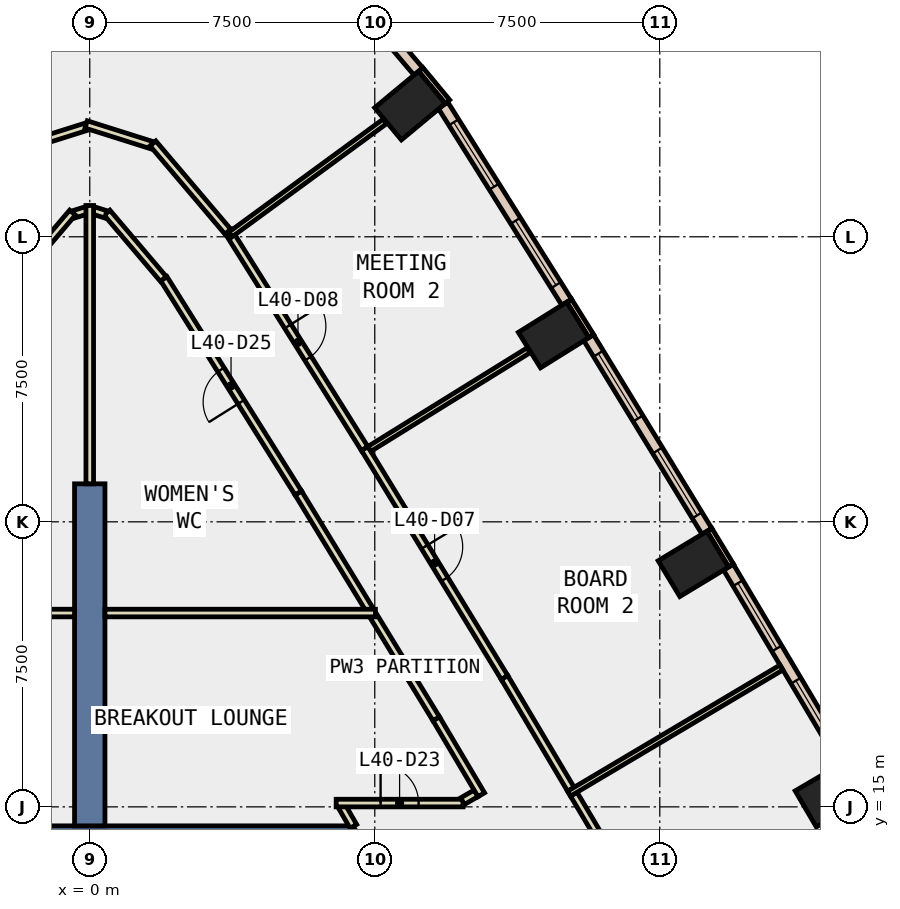
"""IFC4 building model, lengths in metres.
Left out: names, types, materials, properties, quantities, classifications, styles, units other than length and angle.
Written with IfcOpenShell. Run it as: python <this file> out.ifc"""

import sys

from ifc_helpers import new_model, si_unit, direction, frame, frame_2d, origin, origin_2d, place, context, subcontext, project, spatial, polyline, rectangle, outline, extrude, element, fill, save


model = new_model("IFC4")
c1 = context("Model", 3, precision=1e-05, world=origin(), true_north=direction((0.0, 1.0)))
c2 = subcontext(c1, "Body", "Model", "MODEL_VIEW")
j1 = project(units=[si_unit("LENGTHUNIT", "METRE"), si_unit("PLANEANGLEUNIT", "RADIAN")], contexts=[c1])
p1 = place(None, origin())
s1 = spatial("IfcSite", under=j1, at=p1, CompositionType="ELEMENT")
p2 = place(p1, origin())
s2 = spatial("IfcBuilding", under=s1, at=p2, CompositionType="ELEMENT")
p3 = place(p2, frame((0.0, 0.0, 180.2)))
s3 = spatial("IfcBuildingStorey", under=s2, at=p3, CompositionType="ELEMENT", Elevation=180.2)
for number, where, z_axis, x_axis in (
    (1, (19.488, 15.326, -0.4), (0.0, 0.0, 1.0), (-0.506, 0.863, 0.0)),
    (2, (15.884, 21.393, -0.4), (0.0, 0.0, 1.0), (-0.518, 0.855, 0.0)),
    (3, (12.206, 27.416, -0.4), (0.0, 0.0, 1.0), (-0.53, 0.848, 0.0)),
    (4, (8.426, 33.452, -0.4), (0.0, 0.0, 1.0), (-0.639, 0.769, 0.0)),
):
    element("IfcColumn", number, at=place(p3, frame(where, z_axis=z_axis, x_axis=x_axis)), inside=s3, PredefinedType="COLUMN", context=c2, shape_type="SweptSolid", body=[
        extrude(rectangle(XDim=1.1, YDim=1.5, at=origin_2d()), origin(), (0.0, 0.0, 1.0), 4.0),
    ])
p4 = place(p3, frame((0.0, 0.0, -0.4)))
e5 = element("IfcWall", 5, at=p4, inside=s3, PredefinedType="SHEAR", context=c2, shape_type="SweptSolid", body=[
    extrude(outline(polyline([(6.651, 12.98), (7.517, 13.48), (6.928, 14.5), (6.351, 13.5), (6.651, 12.98)])), origin(), (0.0, 0.0, 1.0), 4.0),
])
p5 = place(p3, frame((0.0, 0.0, -0.4)))
e6 = element("IfcWall", 6, at=p5, inside=s3, PredefinedType="SHEAR", context=c2, shape_type="SweptSolid", body=[
    extrude(outline(polyline([(6.928, 14.5), (-6.928, 14.5), (-6.351, 13.5), (6.351, 13.5), (6.928, 14.5)])), origin(), (0.0, 0.0, 1.0), 4.0),
])
p6 = place(p3, frame((0.0, 14.5, -0.4), z_axis=(0.0, 0.0, 1.0), x_axis=(0.0, 1.0, 0.0)))
e7 = element("IfcWall", 7, at=p6, inside=s3, PredefinedType="SHEAR", context=c2, shape_type="SweptSolid", body=[
    extrude(rectangle(XDim=9.0, YDim=0.8, at=frame_2d((4.5, 0.0))), origin(), (0.0, 0.0, 1.0), 4.0),
])
p7 = place(p3, frame((16.875, 21.35, 0.0), z_axis=(0.0, 0.0, 1.0), x_axis=(-0.518178754102, 0.855272341888, 0.0)))
e8 = element("IfcWall", 8, at=p7, inside=s3, PredefinedType="STANDARD", context=c2, shape_type="SweptSolid", body=[
    extrude(rectangle(XDim=1.1, YDim=0.15, at=frame_2d((0.55, 0.0))), origin(), (0.0, 0.0, 1.0), 3.6),
])
p8 = place(p3, frame((13.197, 27.387, 0.0), z_axis=(0.0, 0.0, 1.0), x_axis=(-0.529879262372, 0.848073090782, 0.0)))
e9 = element("IfcWall", 9, at=p8, inside=s3, PredefinedType="STANDARD", context=c2, shape_type="SweptSolid", body=[
    extrude(rectangle(XDim=1.1, YDim=0.15, at=frame_2d((0.55, 0.0))), origin(), (0.0, 0.0, 1.0), 3.6),
])
p9 = place(p3, frame((9.412, 33.556, 0.0), z_axis=(0.0, 0.0, 1.0), x_axis=(-0.639092407347, 0.769129959676, 0.0)))
e10 = element("IfcWall", 10, at=p9, inside=s3, PredefinedType="STANDARD", context=c2, shape_type="SweptSolid", body=[
    extrude(rectangle(XDim=1.1, YDim=0.15, at=frame_2d((0.55, 0.0))), origin(), (0.0, 0.0, 1.0), 3.6),
])
p10 = place(p3, frame((19.854, 16.177, 0.0), z_axis=(0.0, 0.0, 1.0), x_axis=(-0.510653096173, 0.859786842984, 0.0)))
e11 = element("IfcWall", 11, at=p10, inside=s3, PredefinedType="STANDARD", context=c2, shape_type="SweptSolid", body=[
    extrude(rectangle(XDim=5.969, YDim=0.3, at=frame_2d((2.984, 0.0))), origin(), (0.0, 0.0, 1.0), 3.6),
])
p11 = place(p10, frame((0.492, 0.0, 0.9)))
e12 = element("IfcOpeningElement", 12, at=p11, cuts=e11, PredefinedType="OPENING", context=c2, shape_type="SweptSolid", body=[
    extrude(rectangle(XDim=2.0, YDim=2.6, at=frame_2d((1.0, 1.3))), frame((0.0, 0.16, 0.0), z_axis=(0.0, -1.0, 0.0), x_axis=(1.0, 0.0, 0.0)), (0.0, 0.0, 1.0), 0.32),
])
p12 = place(p10, frame((3.477, 0.0, 0.9)))
e13 = element("IfcOpeningElement", 13, at=p12, cuts=e11, PredefinedType="OPENING", context=c2, shape_type="SweptSolid", body=[
    extrude(rectangle(XDim=2.0, YDim=2.6, at=frame_2d((1.0, 1.3))), frame((0.0, 0.16, 0.0), z_axis=(0.0, -1.0, 0.0), x_axis=(1.0, 0.0, 0.0)), (0.0, 0.0, 1.0), 0.32),
])
p13 = place(p3, frame((16.24, 22.25, 0.0), z_axis=(0.0, 0.0, 1.0), x_axis=(-0.521263083766, 0.8533960379, 0.0)))
e14 = element("IfcWall", 14, at=p13, inside=s3, PredefinedType="STANDARD", context=c2, shape_type="SweptSolid", body=[
    extrude(rectangle(XDim=5.97, YDim=0.3, at=frame_2d((2.985, 0.0))), origin(), (0.0, 0.0, 1.0), 3.6),
])
p14 = place(p13, frame((0.493, 0.0, 0.9)))
e15 = element("IfcOpeningElement", 15, at=p14, cuts=e14, PredefinedType="OPENING", context=c2, shape_type="SweptSolid", body=[
    extrude(rectangle(XDim=2.0, YDim=2.6, at=frame_2d((1.0, 1.3))), frame((0.0, 0.16, 0.0), z_axis=(0.0, -1.0, 0.0), x_axis=(1.0, 0.0, 0.0)), (0.0, 0.0, 1.0), 0.32),
])
p15 = place(p13, frame((3.478, 0.0, 0.9)))
e16 = element("IfcOpeningElement", 16, at=p15, cuts=e14, PredefinedType="OPENING", context=c2, shape_type="SweptSolid", body=[
    extrude(rectangle(XDim=2.0, YDim=2.6, at=frame_2d((1.0, 1.3))), frame((0.0, 0.16, 0.0), z_axis=(0.0, -1.0, 0.0), x_axis=(1.0, 0.0, 0.0)), (0.0, 0.0, 1.0), 0.32),
])
p16 = place(p3, frame((12.55, 28.279, 0.0), z_axis=(0.0, 0.0, 1.0), x_axis=(-0.531816047834, 0.846859900613, 0.0)))
e17 = element("IfcWall", 17, at=p16, inside=s3, PredefinedType="STANDARD", context=c2, shape_type="SweptSolid", body=[
    extrude(rectangle(XDim=6.119, YDim=0.3, at=frame_2d((3.06, 0.0))), origin(), (0.0, 0.0, 1.0), 3.6),
])
p17 = place(p16, frame((0.53, 0.0, 0.9)))
e18 = element("IfcOpeningElement", 18, at=p17, cuts=e17, PredefinedType="OPENING", context=c2, shape_type="SweptSolid", body=[
    extrude(rectangle(XDim=2.0, YDim=2.6, at=frame_2d((1.0, 1.3))), frame((0.0, 0.16, 0.0), z_axis=(0.0, -1.0, 0.0), x_axis=(1.0, 0.0, 0.0)), (0.0, 0.0, 1.0), 0.32),
])
p18 = place(p16, frame((3.589, 0.0, 0.9)))
e19 = element("IfcOpeningElement", 19, at=p18, cuts=e17, PredefinedType="OPENING", context=c2, shape_type="SweptSolid", body=[
    extrude(rectangle(XDim=2.0, YDim=2.6, at=frame_2d((1.0, 1.3))), frame((0.0, 0.16, 0.0), z_axis=(0.0, -1.0, 0.0), x_axis=(1.0, 0.0, 0.0)), (0.0, 0.0, 1.0), 0.32),
])
p19 = place(p3, frame((8.647, 34.35, 0.0), z_axis=(0.0, 0.0, 1.0), x_axis=(-0.647156077277, 0.76235753531, 0.0)))
e20 = element("IfcWall", 20, at=p19, inside=s3, PredefinedType="STANDARD", context=c2, shape_type="SweptSolid", body=[
    extrude(rectangle(XDim=4.262, YDim=0.3, at=frame_2d((2.131, 0.0))), origin(), (0.0, 0.0, 1.0), 3.6),
])
p20 = place(p19, frame((1.431, 0.0, 0.9)))
e21 = element("IfcOpeningElement", 21, at=p20, cuts=e20, PredefinedType="OPENING", context=c2, shape_type="SweptSolid", body=[
    extrude(rectangle(XDim=1.4, YDim=2.6, at=frame_2d((0.7, 1.3))), frame((0.0, 0.16, 0.0), z_axis=(0.0, -1.0, 0.0), x_axis=(1.0, 0.0, 0.0)), (0.0, 0.0, 1.0), 0.32),
])
p21 = place(p3, frame((6.937, 14.488, 0.0), z_axis=(0.0, 0.0, 1.0), x_axis=(-0.499908430952, 0.866078264744, 0.0)))
e22 = element("IfcWall", 22, at=p21, inside=s3, PredefinedType="PARTITIONING", context=c2, shape_type="SweptSolid", body=[
    extrude(rectangle(XDim=0.606, YDim=0.2, at=frame_2d((0.303, 0.0))), origin(), (0.0, 0.0, 1.0), 3.6),
])
p22 = place(p3, frame((6.484, 15.1, 0.0), z_axis=(0.0, 0.0, 1.0), x_axis=(1.0, 0.0, 0.0)))
e23 = element("IfcWall", 23, at=p22, inside=s3, PredefinedType="PARTITIONING", context=c2, shape_type="SweptSolid", body=[
    extrude(rectangle(XDim=3.339, YDim=0.2, at=frame_2d((1.669, 0.0))), origin(), (0.0, 0.0, 1.0), 3.6),
])
p23 = place(p22, frame((1.169, 0.0, 0.0)))
e24 = element("IfcOpeningElement", 24, at=p23, cuts=e23, PredefinedType="OPENING", context=c2, shape_type="SweptSolid", body=[
    extrude(rectangle(XDim=1.0, YDim=2.1, at=frame_2d((0.5, 1.05))), frame((0.0, 0.11, 0.0), z_axis=(0.0, -1.0, 0.0), x_axis=(1.0, 0.0, 0.0)), (0.0, 0.0, 1.0), 0.22),
])
p24 = place(p3, frame((9.81, 15.15, 0.0), z_axis=(0.0, 0.0, 1.0), x_axis=(0.865888002441, 0.500237910626, 0.0)))
e25 = element("IfcWall", 25, at=p24, inside=s3, PredefinedType="PARTITIONING", context=c2, shape_type="SweptSolid", body=[
    extrude(rectangle(XDim=0.41, YDim=0.2, at=frame_2d((0.205, 0.0))), origin(), (0.0, 0.0, 1.0), 3.6),
])
p25 = place(p3, frame((10.303, 15.319, 0.0), z_axis=(0.0, 0.0, 1.0), x_axis=(-0.510383520765, 0.859946894716, 0.0)))
e26 = element("IfcWall", 26, at=p25, inside=s3, PredefinedType="PARTITIONING", context=c2, shape_type="SweptSolid", body=[
    extrude(rectangle(XDim=2.326, YDim=0.2, at=frame_2d((1.163, 0.0))), origin(), (0.0, 0.0, 1.0), 3.6),
])
p26 = place(p3, frame((9.116, 17.319, 0.0), z_axis=(0.0, 0.0, 1.0), x_axis=(-0.521343721083, 0.853346778565, 0.0)))
e27 = element("IfcWall", 27, at=p26, inside=s3, PredefinedType="PARTITIONING", context=c2, shape_type="SweptSolid", body=[
    extrude(rectangle(XDim=3.159, YDim=0.2, at=frame_2d((1.58, 0.0))), origin(), (0.0, 0.0, 1.0), 3.6),
])
p27 = place(p3, frame((7.365, 20.185, 0.0), z_axis=(0.0, 0.0, 1.0), x_axis=(-0.521206053955, 0.853430869679, 0.0)))
e28 = element("IfcWall", 28, at=p27, inside=s3, PredefinedType="PARTITIONING", context=c2, shape_type="SweptSolid", body=[
    extrude(rectangle(XDim=3.603, YDim=0.2, at=frame_2d((1.802, 0.0))), origin(), (0.0, 0.0, 1.0), 3.6),
])
p28 = place(p3, frame((5.487, 23.26, 0.0), z_axis=(0.0, 0.0, 1.0), x_axis=(-0.531656179122, 0.846960274866, 0.0)))
e29 = element("IfcWall", 29, at=p28, inside=s3, PredefinedType="PARTITIONING", context=c2, shape_type="SweptSolid", body=[
    extrude(rectangle(XDim=6.657, YDim=0.2, at=frame_2d((3.328, 0.0))), origin(), (0.0, 0.0, 1.0), 3.6),
])
p29 = place(p28, frame((2.828, 0.0, 0.0)))
e30 = element("IfcOpeningElement", 30, at=p29, cuts=e29, PredefinedType="OPENING", context=c2, shape_type="SweptSolid", body=[
    extrude(rectangle(XDim=1.0, YDim=2.1, at=frame_2d((0.5, 1.05))), frame((0.0, 0.11, 0.0), z_axis=(0.0, -1.0, 0.0), x_axis=(1.0, 0.0, 0.0)), (0.0, 0.0, 1.0), 0.22),
])
p30 = place(p3, frame((1.936, 28.89, 0.0), z_axis=(0.0, 0.0, 1.0), x_axis=(-0.647388540773, 0.762160138866, 0.0)))
e31 = element("IfcWall", 31, at=p30, inside=s3, PredefinedType="PARTITIONING", context=c2, shape_type="SweptSolid", body=[
    extrude(rectangle(XDim=2.291, YDim=0.2, at=frame_2d((1.146, 0.0))), origin(), (0.0, 0.0, 1.0), 3.6),
])
p31 = place(p3, frame((0.423, 30.59, 0.0), z_axis=(0.0, 0.0, 1.0), x_axis=(-0.954074901128, 0.29956816092, 0.0)))
e32 = element("IfcWall", 32, at=p31, inside=s3, PredefinedType="PARTITIONING", context=c2, shape_type="SweptSolid", body=[
    extrude(rectangle(XDim=0.344, YDim=0.2, at=frame_2d((0.172, 0.0))), origin(), (0.0, 0.0, 1.0), 3.6),
])
p32 = place(p3, frame((-0.048, 30.708, 0.0), z_axis=(0.0, 0.0, 1.0), x_axis=(-0.953948026088, -0.299971937891, 0.0)))
e33 = element("IfcWall", 33, at=p32, inside=s3, PredefinedType="PARTITIONING", context=c2, shape_type="SweptSolid", body=[
    extrude(rectangle(XDim=0.393, YDim=0.2, at=frame_2d((0.197, 0.0))), origin(), (0.0, 0.0, 1.0), 3.6),
])
p33 = place(p3, frame((-0.453, 30.636, 0.0), z_axis=(0.0, 0.0, 1.0), x_axis=(-0.647388540773, -0.762160138866, 0.0)))
e34 = element("IfcWall", 34, at=p33, inside=s3, PredefinedType="PARTITIONING", context=c2, shape_type="SweptSolid", body=[
    extrude(rectangle(XDim=2.291, YDim=0.2, at=frame_2d((1.146, 0.0))), origin(), (0.0, 0.0, 1.0), 3.6),
])
p34 = place(p3, frame((12.737, 15.334, 0.0), z_axis=(0.0, 0.0, 1.0), x_axis=(0.51050904729, -0.859872381598, 0.0)))
e35 = element("IfcWall", 35, at=p34, inside=s3, PredefinedType="PARTITIONING", context=c2, shape_type="SweptSolid", body=[
    extrude(rectangle(XDim=3.418, YDim=0.2, at=frame_2d((1.709, 0.0))), origin(), (0.0, 0.0, 1.0), 3.6),
])
p35 = place(p3, frame((7.234, 24.43, 0.0), z_axis=(0.0, 0.0, 1.0), x_axis=(0.521189922749, -0.853440721096, 0.0)))
e36 = element("IfcWall", 36, at=p35, inside=s3, PredefinedType="PARTITIONING", context=c2, shape_type="SweptSolid", body=[
    extrude(rectangle(XDim=7.063, YDim=0.2, at=frame_2d((3.531, 0.0))), origin(), (0.0, 0.0, 1.0), 3.6),
])
p36 = place(p35, frame((3.031, 0.0, 0.0)))
e37 = element("IfcOpeningElement", 37, at=p36, cuts=e36, PredefinedType="OPENING", context=c2, shape_type="SweptSolid", body=[
    extrude(rectangle(XDim=1.0, YDim=2.1, at=frame_2d((0.5, 1.05))), frame((0.0, 0.11, 0.0), z_axis=(0.0, -1.0, 0.0), x_axis=(1.0, 0.0, 0.0)), (0.0, 0.0, 1.0), 0.22),
])
p37 = place(p3, frame((10.915, 18.402, 0.0), z_axis=(0.0, 0.0, 1.0), x_axis=(0.510477693133, -0.85989099589, 0.0)))
e38 = element("IfcWall", 38, at=p37, inside=s3, PredefinedType="PARTITIONING", context=c2, shape_type="SweptSolid", body=[
    extrude(rectangle(XDim=3.418, YDim=0.2, at=frame_2d((1.709, 0.0))), origin(), (0.0, 0.0, 1.0), 3.6),
])
p38 = place(p3, frame((3.646, 30.142, 0.0), z_axis=(0.0, 0.0, 1.0), x_axis=(0.531621424046, -0.846982090422, 0.0)))
e39 = element("IfcWall", 39, at=p38, inside=s3, PredefinedType="PARTITIONING", context=c2, shape_type="SweptSolid", body=[
    extrude(rectangle(XDim=6.745, YDim=0.2, at=frame_2d((3.373, 0.0))), origin(), (0.0, 0.0, 1.0), 3.6),
])
p39 = place(p38, frame((2.948, 0.0, 0.0)))
e40 = element("IfcOpeningElement", 40, at=p39, cuts=e39, PredefinedType="OPENING", context=c2, shape_type="SweptSolid", body=[
    extrude(rectangle(XDim=1.0, YDim=2.1, at=frame_2d((0.5, 1.05))), frame((0.0, 0.11, 0.0), z_axis=(0.0, -1.0, 0.0), x_axis=(1.0, 0.0, 0.0)), (0.0, 0.0, 1.0), 0.22),
])
p40 = place(p3, frame((-1.632, 32.411, 0.0), z_axis=(0.0, 0.0, 1.0), x_axis=(0.953809064266, 0.300413496575, 0.0)))
e41 = element("IfcWall", 41, at=p40, inside=s3, PredefinedType="PARTITIONING", context=c2, shape_type="SweptSolid", body=[
    extrude(rectangle(XDim=1.612, YDim=0.2, at=frame_2d((0.806, 0.0))), origin(), (0.0, 0.0, 1.0), 3.6),
])
p41 = place(p3, frame((-0.095, 32.956, 0.0), z_axis=(0.0, 0.0, 1.0), x_axis=(0.953617294109, -0.301021687552, 0.0)))
e42 = element("IfcWall", 42, at=p41, inside=s3, PredefinedType="PARTITIONING", context=c2, shape_type="SweptSolid", body=[
    extrude(rectangle(XDim=1.811, YDim=0.2, at=frame_2d((0.906, 0.0))), origin(), (0.0, 0.0, 1.0), 3.6),
])
p42 = place(p3, frame((1.662, 32.457, 0.0), z_axis=(0.0, 0.0, 1.0), x_axis=(0.647148242723, -0.762364185899, 0.0)))
e43 = element("IfcWall", 43, at=p42, inside=s3, PredefinedType="PARTITIONING", context=c2, shape_type="SweptSolid", body=[
    extrude(rectangle(XDim=3.047, YDim=0.2, at=frame_2d((1.523, 0.0))), origin(), (0.0, 0.0, 1.0), 3.6),
])
p43 = place(p3, frame((0.4, 20.1, 0.0), z_axis=(0.0, 0.0, 1.0), x_axis=(1.0, 0.0, 0.0)))
e44 = element("IfcWall", 44, at=p43, inside=s3, PredefinedType="PARTITIONING", context=c2, shape_type="SweptSolid", body=[
    extrude(rectangle(XDim=7.117, YDim=0.2, at=frame_2d((3.559, 0.0))), origin(), (0.0, 0.0, 1.0), 3.6),
])
p44 = place(p3, frame((-4.825, 20.1, 0.0), z_axis=(0.0, 0.0, 1.0), x_axis=(1.0, 0.0, 0.0)))
e45 = element("IfcWall", 45, at=p44, inside=s3, PredefinedType="PARTITIONING", context=c2, shape_type="SweptSolid", body=[
    extrude(rectangle(XDim=4.425, YDim=0.2, at=frame_2d((2.212, 0.0))), origin(), (0.0, 0.0, 1.0), 3.6),
])
p45 = place(p3, frame((0.0, 23.5, 0.0), z_axis=(0.0, 0.0, 1.0), x_axis=(0.0, 1.0, 0.0)))
e46 = element("IfcWall", 46, at=p45, inside=s3, PredefinedType="PARTITIONING", context=c2, shape_type="SweptSolid", body=[
    extrude(rectangle(XDim=7.323, YDim=0.2, at=frame_2d((3.662, 0.0))), origin(), (0.0, 0.0, 1.0), 3.6),
])
p46 = place(p3, frame((12.613, 15.348, 0.0), z_axis=(0.0, 0.0, 1.0), x_axis=(0.85976815765, 0.510684555368, 0.0)))
e47 = element("IfcWall", 47, at=p46, inside=s3, PredefinedType="PARTITIONING", context=c2, shape_type="SweptSolid", body=[
    extrude(rectangle(XDim=6.499, YDim=0.15, at=frame_2d((3.25, 0.0))), origin(), (0.0, 0.0, 1.0), 3.6),
])
p47 = place(p3, frame((7.358, 24.418, 0.0), z_axis=(0.0, 0.0, 1.0), x_axis=(0.850136365231, 0.526562589358, 0.0)))
e48 = element("IfcWall", 48, at=p47, inside=s3, PredefinedType="PARTITIONING", context=c2, shape_type="SweptSolid", body=[
    extrude(rectangle(XDim=4.93, YDim=0.15, at=frame_2d((2.465, 0.0))), origin(), (0.0, 0.0, 1.0), 3.6),
])
p48 = place(p3, frame((3.699, 30.058, 0.0), z_axis=(0.0, 0.0, 1.0), x_axis=(0.806852521394, 0.59075291681, 0.0)))
e49 = element("IfcWall", 49, at=p48, inside=s3, PredefinedType="PARTITIONING", context=c2, shape_type="SweptSolid", body=[
    extrude(rectangle(XDim=5.044, YDim=0.15, at=frame_2d((2.522, 0.0))), origin(), (0.0, 0.0, 1.0), 3.6),
])
p49 = place(p11, origin())
e50 = element("IfcWindow", 50, at=p49, inside=s3, PartitioningType="SINGLE_PANEL", PredefinedType="WINDOW", context=c2, shape_type="SweptSolid", body=[
    extrude(rectangle(XDim=2.0, YDim=2.6, at=frame_2d((1.0, 1.3))), frame((0.0, 0.03, 0.0), z_axis=(0.0, -1.0, 0.0), x_axis=(1.0, 0.0, 0.0)), (0.0, 0.0, 1.0), 0.06),
])
fill(e12, e50)
p50 = place(p12, origin())
e51 = element("IfcWindow", 51, at=p50, inside=s3, PartitioningType="SINGLE_PANEL", PredefinedType="WINDOW", context=c2, shape_type="SweptSolid", body=[
    extrude(rectangle(XDim=2.0, YDim=2.6, at=frame_2d((1.0, 1.3))), frame((0.0, 0.03, 0.0), z_axis=(0.0, -1.0, 0.0), x_axis=(1.0, 0.0, 0.0)), (0.0, 0.0, 1.0), 0.06),
])
fill(e13, e51)
p51 = place(p14, origin())
e52 = element("IfcWindow", 52, at=p51, inside=s3, PartitioningType="SINGLE_PANEL", PredefinedType="WINDOW", context=c2, shape_type="SweptSolid", body=[
    extrude(rectangle(XDim=2.0, YDim=2.6, at=frame_2d((1.0, 1.3))), frame((0.0, 0.03, 0.0), z_axis=(0.0, -1.0, 0.0), x_axis=(1.0, 0.0, 0.0)), (0.0, 0.0, 1.0), 0.06),
])
fill(e15, e52)
p52 = place(p15, origin())
e53 = element("IfcWindow", 53, at=p52, inside=s3, PartitioningType="SINGLE_PANEL", PredefinedType="WINDOW", context=c2, shape_type="SweptSolid", body=[
    extrude(rectangle(XDim=2.0, YDim=2.6, at=frame_2d((1.0, 1.3))), frame((0.0, 0.03, 0.0), z_axis=(0.0, -1.0, 0.0), x_axis=(1.0, 0.0, 0.0)), (0.0, 0.0, 1.0), 0.06),
])
fill(e16, e53)
p53 = place(p17, origin())
e54 = element("IfcWindow", 54, at=p53, inside=s3, PartitioningType="SINGLE_PANEL", PredefinedType="WINDOW", context=c2, shape_type="SweptSolid", body=[
    extrude(rectangle(XDim=2.0, YDim=2.6, at=frame_2d((1.0, 1.3))), frame((0.0, 0.03, 0.0), z_axis=(0.0, -1.0, 0.0), x_axis=(1.0, 0.0, 0.0)), (0.0, 0.0, 1.0), 0.06),
])
fill(e18, e54)
p54 = place(p18, origin())
e55 = element("IfcWindow", 55, at=p54, inside=s3, PartitioningType="SINGLE_PANEL", PredefinedType="WINDOW", context=c2, shape_type="SweptSolid", body=[
    extrude(rectangle(XDim=2.0, YDim=2.6, at=frame_2d((1.0, 1.3))), frame((0.0, 0.03, 0.0), z_axis=(0.0, -1.0, 0.0), x_axis=(1.0, 0.0, 0.0)), (0.0, 0.0, 1.0), 0.06),
])
fill(e19, e55)
p55 = place(p36, origin())
e56 = element("IfcDoor", 56, at=p55, inside=s3, OperationType="SINGLE_SWING_RIGHT", PredefinedType="DOOR", context=c2, shape_type="SweptSolid", body=[
    extrude(rectangle(XDim=1.0, YDim=2.1, at=frame_2d((0.5, 1.05))), frame((0.0, 0.025, 0.0), z_axis=(0.0, -1.0, 0.0), x_axis=(1.0, 0.0, 0.0)), (0.0, 0.0, 1.0), 0.05),
])
fill(e37, e56)
p56 = place(p39, origin())
e57 = element("IfcDoor", 57, at=p56, inside=s3, OperationType="SINGLE_SWING_LEFT", PredefinedType="DOOR", context=c2, shape_type="SweptSolid", body=[
    extrude(rectangle(XDim=1.0, YDim=2.1, at=frame_2d((0.5, 1.05))), frame((0.0, 0.025, 0.0), z_axis=(0.0, -1.0, 0.0), x_axis=(1.0, 0.0, 0.0)), (0.0, 0.0, 1.0), 0.05),
])
fill(e40, e57)
p57 = place(p23, origin())
e58 = element("IfcDoor", 58, at=p57, inside=s3, OperationType="SINGLE_SWING_LEFT", PredefinedType="DOOR", context=c2, shape_type="SweptSolid", body=[
    extrude(rectangle(XDim=1.0, YDim=2.1, at=frame_2d((0.5, 1.05))), frame((0.0, 0.025, 0.0), z_axis=(0.0, -1.0, 0.0), x_axis=(1.0, 0.0, 0.0)), (0.0, 0.0, 1.0), 0.05),
])
fill(e24, e58)
p58 = place(p29, origin())
e59 = element("IfcDoor", 59, at=p58, inside=s3, OperationType="SINGLE_SWING_LEFT", PredefinedType="DOOR", context=c2, shape_type="SweptSolid", body=[
    extrude(rectangle(XDim=1.0, YDim=2.1, at=frame_2d((0.5, 1.05))), frame((0.0, 0.025, 0.0), z_axis=(0.0, -1.0, 0.0), x_axis=(1.0, 0.0, 0.0)), (0.0, 0.0, 1.0), 0.05),
])
fill(e30, e59)
save(model, sys.argv[1])
